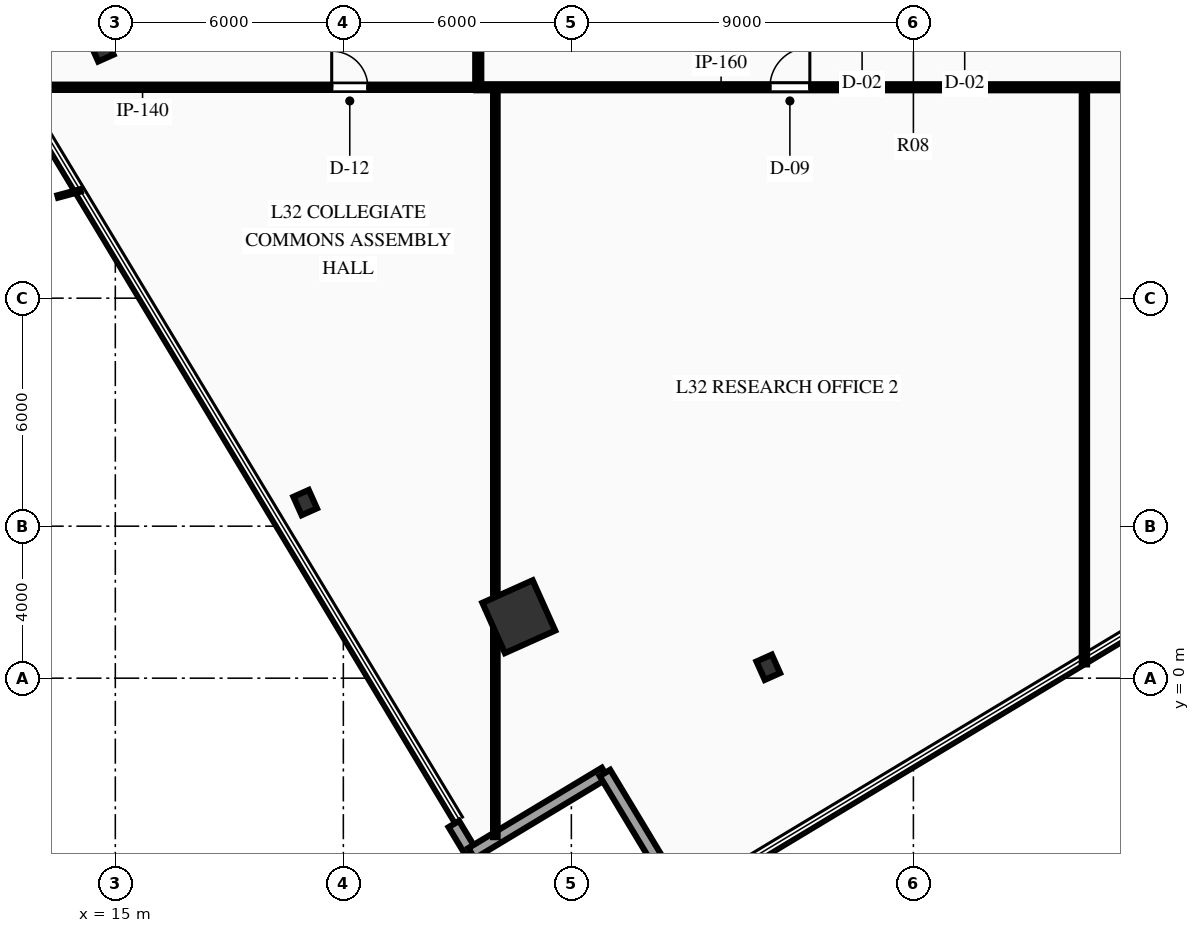
"""IFC4 building model, lengths in metres.
Left out: names, types, materials, properties, quantities, classifications, styles, units other than length and angle.
Written with IfcOpenShell. Run it as: python <this file> out.ifc"""

import sys

from ifc_helpers import new_model, si_unit, direction, frame, frame_2d, origin, origin_2d, place, context, subcontext, project, spatial, rectangle, hollow_rectangle, i_section, extrude, element, fill, save


model = new_model("IFC4")
c1 = context("Model", 3, precision=1e-05, world=origin(), true_north=direction((0.0, 1.0)))
c2 = subcontext(c1, "Body", "Model", "MODEL_VIEW")
j1 = project(units=[si_unit("LENGTHUNIT", "METRE"), si_unit("PLANEANGLEUNIT", "RADIAN")], contexts=[c1])
p1 = place(None, origin())
s1 = spatial("IfcSite", under=j1, at=p1, CompositionType="ELEMENT")
p2 = place(p1, origin())
s2 = spatial("IfcBuilding", under=s1, at=p2, CompositionType="ELEMENT")
p3 = place(p2, frame((0.0, 0.0, 131.7)))
s3 = spatial("IfcBuildingStorey", under=s2, at=p3, CompositionType="ELEMENT", Elevation=131.7)
p4 = place(p3, frame((25.617, 1.618, 0.0), z_axis=(0.0, 0.0, 1.0), x_axis=(0.912477494148, 0.409126902895, 0.0)))
e1 = element("IfcColumn", 1, at=p4, inside=s3, PredefinedType="COLUMN", context=c2, shape_type="SweptSolid", body=[
    extrude(hollow_rectangle(XDim=1.45, YDim=1.45, WallThickness=0.07, at=origin_2d()), origin(), (0.0, 0.0, 1.0), 4.5),
])
for number, where, z_axis, x_axis in (
    (2, (32.181, 0.287, 0.0), (0.0, 0.0, 1.0), (0.912, 0.409, 0.0)),
    (3, (14.643, 16.561, 0.0), (0.0, 0.0, 1.0), (0.912, 0.409, 0.0)),
    (4, (19.996, 4.621, 0.0), (0.0, 0.0, 1.0), (0.912, 0.409, 0.0)),
):
    element("IfcColumn", number, at=place(p3, frame(where, z_axis=z_axis, x_axis=x_axis)), inside=s3, PredefinedType="COLUMN", context=c2, shape_type="SweptSolid", body=[
        extrude(i_section(OverallWidth=0.442, OverallDepth=0.531, WebThickness=0.066, FlangeThickness=0.106, at=origin_2d()), origin(), (0.0, 0.0, 1.0), 4.5),
    ])
p5 = place(p3, frame((24.371, -4.609, 0.0), z_axis=(0.0, 0.0, 1.0), x_axis=(-0.51593110119, 0.856630082839, 0.0)))
e5 = element("IfcWall", 5, at=p5, inside=s3, PredefinedType="STANDARD", context=c2, shape_type="SweptSolid", body=[
    extrude(rectangle(XDim=0.9, YDim=0.32, at=frame_2d((0.45, 0.0))), origin(), (0.0, 0.0, 1.0), 4.1),
])
for number, where, z_axis, x_axis in (
    (6, (27.884, -2.494, 0.0), (0.0, 0.0, 1.0), (-0.857, -0.516, 0.0)),
    (7, (29.999, -6.006, 0.0), (0.0, 0.0, 1.0), (-0.516, 0.857, 0.0)),
):
    element("IfcWall", number, at=place(p3, frame(where, z_axis=z_axis, x_axis=x_axis)), inside=s3, PredefinedType="STANDARD", context=c2, shape_type="SweptSolid", body=[
        extrude(rectangle(XDim=4.1, YDim=0.32, at=frame_2d((2.05, 0.0))), origin(), (0.0, 0.0, 1.0), 4.1),
    ])
p6 = place(p3, frame((24.5, 15.55, 0.0), z_axis=(0.0, 0.0, 1.0), x_axis=(1.0, 0.0, 0.0)))
e8 = element("IfcWall", 8, at=p6, inside=s3, PredefinedType="PARTITIONING", context=c2, shape_type="SweptSolid", body=[
    extrude(rectangle(XDim=23.0, YDim=0.16, at=frame_2d((11.5, 0.0))), origin(), (0.0, 0.0, 1.0), 4.1),
])
p7 = place(p6, frame((7.725, 0.0, 0.0)))
e9 = element("IfcOpeningElement", 9, at=p7, cuts=e8, PredefinedType="OPENING", context=c2, shape_type="SweptSolid", body=[
    extrude(rectangle(XDim=1.05, YDim=2.15, at=frame_2d((0.525, 1.075))), frame((0.0, 0.09, 0.0), z_axis=(0.0, -1.0, 0.0), x_axis=(1.0, 0.0, 0.0)), (0.0, 0.0, 1.0), 0.18),
])
p8 = place(p6, frame((17.489, 0.0, 0.0)))
e10 = element("IfcOpeningElement", 10, at=p8, cuts=e8, PredefinedType="OPENING", context=c2, shape_type="SweptSolid", body=[
    extrude(rectangle(XDim=1.05, YDim=2.15, at=frame_2d((0.525, 1.075))), frame((0.0, 0.09, 0.0), z_axis=(0.0, -1.0, 0.0), x_axis=(1.0, 0.0, 0.0)), (0.0, 0.0, 1.0), 0.18),
])
p9 = place(p3, frame((24.55, 15.55, 0.0), z_axis=(0.0, 0.0, 1.0), x_axis=(0.0, 1.0, 0.0)))
e11 = element("IfcWall", 11, at=p9, inside=s3, PredefinedType="PARTITIONING", context=c2, shape_type="SweptSolid", body=[
    extrude(rectangle(XDim=20.9, YDim=0.16, at=frame_2d((10.45, 0.0))), origin(), (0.0, 0.0, 1.0), 4.1),
])
p10 = place(p9, frame((5.107, 0.0, 0.0)))
e12 = element("IfcOpeningElement", 12, at=p10, cuts=e11, PredefinedType="OPENING", context=c2, shape_type="SweptSolid", body=[
    extrude(rectangle(XDim=1.05, YDim=2.15, at=frame_2d((0.525, 1.075))), frame((0.0, 0.09, 0.0), z_axis=(0.0, -1.0, 0.0), x_axis=(1.0, 0.0, 0.0)), (0.0, 0.0, 1.0), 0.18),
])
p11 = place(p9, frame((12.155, 0.0, 0.0)))
e13 = element("IfcOpeningElement", 13, at=p11, cuts=e11, PredefinedType="OPENING", context=c2, shape_type="SweptSolid", body=[
    extrude(rectangle(XDim=1.05, YDim=2.15, at=frame_2d((0.525, 1.075))), frame((0.0, 0.09, 0.0), z_axis=(0.0, -1.0, 0.0), x_axis=(1.0, 0.0, 0.0)), (0.0, 0.0, 1.0), 0.18),
])
p12 = place(p9, frame((16.443, 0.0, 0.0)))
e14 = element("IfcOpeningElement", 14, at=p12, cuts=e11, PredefinedType="OPENING", context=c2, shape_type="SweptSolid", body=[
    extrude(rectangle(XDim=1.05, YDim=2.15, at=frame_2d((0.525, 1.075))), frame((0.0, 0.09, 0.0), z_axis=(0.0, -1.0, 0.0), x_axis=(1.0, 0.0, 0.0)), (0.0, 0.0, 1.0), 0.18),
])
p13 = place(p3, frame((12.281, 15.55, 0.0), z_axis=(0.0, 0.0, 1.0), x_axis=(1.0, 0.0, 0.0)))
e15 = element("IfcWall", 15, at=p13, inside=s3, PredefinedType="PARTITIONING", context=c2, shape_type="SweptSolid", body=[
    extrude(rectangle(XDim=12.269, YDim=0.14, at=frame_2d((6.134, 0.0))), origin(), (0.0, 0.0, 1.0), 4.1),
])
p14 = place(p13, frame((8.413, 0.0, 0.0)))
e16 = element("IfcOpeningElement", 16, at=p14, cuts=e15, PredefinedType="OPENING", context=c2, shape_type="SweptSolid", body=[
    extrude(rectangle(XDim=0.95, YDim=2.15, at=frame_2d((0.475, 1.075))), frame((0.0, 0.08, 0.0), z_axis=(0.0, -1.0, 0.0), x_axis=(1.0, 0.0, 0.0)), (0.0, 0.0, 1.0), 0.16),
])
p15 = place(p3, frame((25.0, -4.183, 0.0), z_axis=(0.0, 0.0, 1.0), x_axis=(0.0, 1.0, 0.0)))
e17 = element("IfcWall", 17, at=p15, inside=s3, PredefinedType="PARTITIONING", context=c2, shape_type="SweptSolid", body=[
    extrude(rectangle(XDim=19.733, YDim=0.12, at=frame_2d((9.867, 0.0))), origin(), (0.0, 0.0, 1.0), 4.1),
])
p16 = place(p3, frame((40.5, 0.363, 0.0), z_axis=(0.0, 0.0, 1.0), x_axis=(0.0, 1.0, 0.0)))
e18 = element("IfcWall", 18, at=p16, inside=s3, PredefinedType="PARTITIONING", context=c2, shape_type="SweptSolid", body=[
    extrude(rectangle(XDim=15.187, YDim=0.14, at=frame_2d((7.594, 0.0))), origin(), (0.0, 0.0, 1.0), 4.1),
])
p17 = place(p14, origin())
e19 = element("IfcDoor", 19, at=p17, inside=s3, OperationType="SINGLE_SWING_LEFT", PredefinedType="DOOR", context=c2, shape_type="SweptSolid", body=[
    extrude(rectangle(XDim=0.95, YDim=2.15, at=frame_2d((0.475, 1.075))), frame((0.0, 0.025, 0.0), z_axis=(0.0, -1.0, 0.0), x_axis=(1.0, 0.0, 0.0)), (0.0, 0.0, 1.0), 0.05),
])
fill(e16, e19)
p18 = place(p7, origin())
e20 = element("IfcDoor", 20, at=p18, inside=s3, OperationType="SINGLE_SWING_RIGHT", PredefinedType="DOOR", context=c2, shape_type="SweptSolid", body=[
    extrude(rectangle(XDim=1.05, YDim=2.15, at=frame_2d((0.525, 1.075))), frame((0.0, 0.025, 0.0), z_axis=(0.0, -1.0, 0.0), x_axis=(1.0, 0.0, 0.0)), (0.0, 0.0, 1.0), 0.05),
])
fill(e9, e20)
save(model, sys.argv[1])
